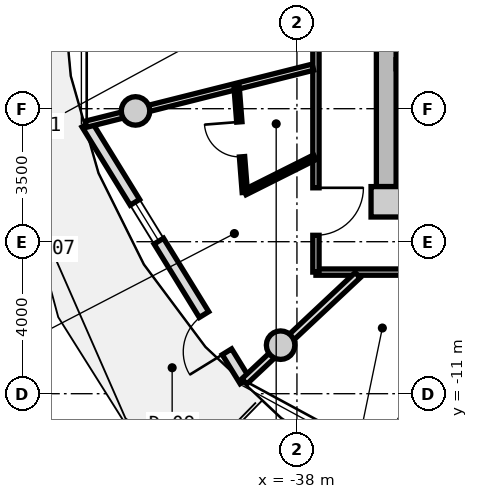
"""IFC4 building model, lengths in metres.
Left out: names, types, materials, properties, quantities, classifications, styles, units other than length and angle.
Written with IfcOpenShell. Run it as: python <this file> out.ifc"""

import sys

from ifc_helpers import new_model, si_unit, direction, frame, frame_2d, origin, origin_2d, place, context, subcontext, project, spatial, rectangle, circle, extrude, source, transform, mapped, element, fill, save


model = new_model("IFC4")
c1 = context("Model", 3, precision=1e-05, world=origin(), true_north=direction((0.0, 1.0)))
c2 = subcontext(c1, "Body", "Model", "MODEL_VIEW")
j1 = project(units=[si_unit("LENGTHUNIT", "METRE"), si_unit("PLANEANGLEUNIT", "RADIAN")], contexts=[c1])
p1 = place(None, origin())
s1 = spatial("IfcSite", under=j1, at=p1, CompositionType="ELEMENT")
p2 = place(p1, origin())
s2 = spatial("IfcBuilding", under=s1, at=p2, CompositionType="ELEMENT")
p3 = place(p2, frame((0.0, 0.0, 232.2)))
s3 = spatial("IfcBuildingStorey", under=s2, at=p3, CompositionType="ELEMENT", Elevation=232.2)
m1 = source(origin(), c2, "Body", "SweptSolid", [
    extrude(rectangle(XDim=0.8, YDim=0.8, at=origin_2d()), origin(), (0.0, 0.0, 1.0), 3.05),
])
p4 = place(p3, frame((-35.65, -5.95, 0.0), z_axis=(0.0, 0.0, 1.0), x_axis=(1.0, 0.0, 0.0)))
e1 = element("IfcColumn", 1, at=p4, inside=s3, PredefinedType="COLUMN", context=c2, shape_type="MappedRepresentation", body=[
    mapped(m1, transform((0.0, 0.0, 0.0), x_axis=(1.0, 0.0, 0.0), y_axis=(0.0, 1.0, 0.0), z_axis=(0.0, 0.0, 1.0), scale=1.0)),
])
m2 = source(origin(), c2, "Body", "SweptSolid", [
    extrude(rectangle(XDim=11.1, YDim=0.52, at=frame_2d((5.55, 0.0))), origin(), (0.0, 0.0, 1.0), 2.81),
])
p5 = place(p3, frame((-35.65, -5.55, 0.0), z_axis=(0.0, 0.0, 1.0), x_axis=(0.0, 1.0, 0.0)))
e2 = element("IfcWall", 2, at=p5, inside=s3, PredefinedType="SHEAR", context=c2, shape_type="MappedRepresentation", body=[
    mapped(m2, transform((0.0, 0.0, 0.0), x_axis=(1.0, 0.0, 0.0), y_axis=(0.0, 1.0, 0.0), z_axis=(0.0, 0.0, 1.0), scale=1.0)),
])
p6 = place(p5, frame((3.8, 0.0, 0.0)))
e3 = element("IfcOpeningElement", 3, at=p6, cuts=e2, PredefinedType="OPENING", context=c2, shape_type="SweptSolid", body=[
    extrude(rectangle(XDim=1.2, YDim=2.15, at=frame_2d((0.6, 1.075))), frame((0.0, 0.27, 0.0), z_axis=(0.0, -1.0, 0.0), x_axis=(1.0, 0.0, 0.0)), (0.0, 0.0, 1.0), 0.54),
])
m3 = source(origin(), c2, "Body", "SweptSolid", [
    extrude(circle(Radius=0.375, at=origin_2d()), origin(), (0.0, 0.0, 1.0), 3.05),
])
for number, where, z_axis, x_axis in (
    (4, (-42.247, -3.559, 0.0), (0.0, 0.0, 1.0), (1.0, 0.0, 0.0)),
    (5, (-38.43, -9.723, 0.0), (0.0, 0.0, 1.0), (1.0, 0.0, 0.0)),
):
    element("IfcColumn", number, at=place(p3, frame(where, z_axis=z_axis, x_axis=x_axis)), inside=s3, PredefinedType="COLUMN", context=c2, shape_type="MappedRepresentation", body=[
        mapped(m3, transform((0.0, 0.0, 0.0), x_axis=(1.0, 0.0, 0.0), y_axis=(0.0, 1.0, 0.0), z_axis=(0.0, 0.0, 1.0), scale=1.0)),
    ])
m4 = source(origin(), c2, "Body", "SweptSolid", [
    extrude(rectangle(XDim=7.938, YDim=0.29, at=frame_2d((3.969, 0.0))), origin(), (0.0, 0.0, 1.0), 2.81),
])
p7 = place(p3, frame((-39.37, -10.663, 0.0), z_axis=(0.0, 0.0, 1.0), x_axis=(-0.524244987663, 0.851567491694, 0.0)))
e6 = element("IfcWall", 6, at=p7, inside=s3, PredefinedType="SOLIDWALL", context=c2, shape_type="MappedRepresentation", body=[
    mapped(m4, transform((0.0, 0.0, 0.0), x_axis=(1.0, 0.0, 0.0), y_axis=(0.0, 1.0, 0.0), z_axis=(0.0, 0.0, 1.0), scale=1.0)),
])
p8 = place(p7, frame((0.9, 0.0, 0.0)))
e7 = element("IfcOpeningElement", 7, at=p8, cuts=e6, PredefinedType="OPENING", context=c2, shape_type="SweptSolid", body=[
    extrude(rectangle(XDim=1.15, YDim=2.25, at=frame_2d((0.575, 1.125))), frame((0.0, 0.155, 0.0), z_axis=(0.0, -1.0, 0.0), x_axis=(1.0, 0.0, 0.0)), (0.0, 0.0, 1.0), 0.31),
])
p9 = place(p7, frame((4.319, 0.0, 0.85)))
e8 = element("IfcOpeningElement", 8, at=p9, cuts=e6, PredefinedType="OPENING", context=c2, shape_type="SweptSolid", body=[
    extrude(rectangle(XDim=1.2, YDim=1.5, at=frame_2d((0.6, 0.75))), frame((0.0, 0.155, 0.0), z_axis=(0.0, -1.0, 0.0), x_axis=(1.0, 0.0, 0.0)), (0.0, 0.0, 1.0), 0.31),
])
m5 = source(origin(), c2, "Body", "SweptSolid", [
    extrude(rectangle(XDim=7.93, YDim=0.24, at=frame_2d((3.965, 0.0))), origin(), (0.0, 0.0, 1.0), 2.81),
])
p10 = place(p3, frame((-35.39, -2.33, 0.0), z_axis=(0.0, 0.0, 1.0), x_axis=(1.0, 0.0, 0.0)))
e9 = element("IfcWall", 9, at=p10, inside=s3, PredefinedType="PARTITIONING", context=c2, shape_type="MappedRepresentation", body=[
    mapped(m5, transform((0.0, 0.0, 0.0), x_axis=(1.0, 0.0, 0.0), y_axis=(0.0, 1.0, 0.0), z_axis=(0.0, 0.0, 1.0), scale=1.0)),
])
p11 = place(p10, frame((1.05, 0.0, 0.0)))
e10 = element("IfcOpeningElement", 10, at=p11, cuts=e9, PredefinedType="OPENING", context=c2, shape_type="SweptSolid", body=[
    extrude(rectangle(XDim=1.1, YDim=2.15, at=frame_2d((0.55, 1.075))), frame((0.0, 0.13, 0.0), z_axis=(0.0, -1.0, 0.0), x_axis=(1.0, 0.0, 0.0)), (0.0, 0.0, 1.0), 0.26),
])
m6 = source(origin(), c2, "Body", "SweptSolid", [
    extrude(rectangle(XDim=19.0, YDim=0.165, at=frame_2d((9.5, 0.0))), origin(), (0.0, 0.0, 1.0), 2.795),
])
p12 = place(p3, frame((-18.5, -7.8, 0.0), z_axis=(0.0, 0.0, 1.0), x_axis=(-1.0, 0.0, 0.0)))
e11 = element("IfcWall", 11, at=p12, inside=s3, PredefinedType="PARTITIONING", context=c2, shape_type="MappedRepresentation", body=[
    mapped(m6, transform((0.0, 0.0, 0.0), x_axis=(1.0, 0.0, 0.0), y_axis=(0.0, 1.0, 0.0), z_axis=(0.0, 0.0, 1.0), scale=1.0)),
])
p13 = place(p12, frame((15.586, 0.0, 0.0)))
e12 = element("IfcOpeningElement", 12, at=p13, cuts=e11, PredefinedType="OPENING", context=c2, shape_type="SweptSolid", body=[
    extrude(rectangle(XDim=1.05, YDim=2.15, at=frame_2d((0.525, 1.075))), frame((0.0, 0.093, 0.0), z_axis=(0.0, -1.0, 0.0), x_axis=(1.0, 0.0, 0.0)), (0.0, 0.0, 1.0), 0.185),
])
p14 = place(p12, frame((12.465, 0.0, 0.0)))
e13 = element("IfcOpeningElement", 13, at=p14, cuts=e11, PredefinedType="OPENING", context=c2, shape_type="SweptSolid", body=[
    extrude(rectangle(XDim=1.05, YDim=2.15, at=frame_2d((0.525, 1.075))), frame((0.0, 0.093, 0.0), z_axis=(0.0, -1.0, 0.0), x_axis=(1.0, 0.0, 0.0)), (0.0, 0.0, 1.0), 0.185),
])
p15 = place(p12, frame((8.875, 0.0, 0.0)))
e14 = element("IfcOpeningElement", 14, at=p15, cuts=e11, PredefinedType="OPENING", context=c2, shape_type="SweptSolid", body=[
    extrude(rectangle(XDim=1.25, YDim=2.2, at=frame_2d((0.625, 1.1))), frame((0.0, 0.093, 0.0), z_axis=(0.0, -1.0, 0.0), x_axis=(1.0, 0.0, 0.0)), (0.0, 0.0, 1.0), 0.185),
])
p16 = place(p12, frame((3.559, 0.0, 0.0)))
e15 = element("IfcOpeningElement", 15, at=p16, cuts=e11, PredefinedType="OPENING", context=c2, shape_type="SweptSolid", body=[
    extrude(rectangle(XDim=1.25, YDim=2.2, at=frame_2d((0.625, 1.1))), frame((0.0, 0.093, 0.0), z_axis=(0.0, -1.0, 0.0), x_axis=(1.0, 0.0, 0.0)), (0.0, 0.0, 1.0), 0.185),
])
m7 = source(origin(), c2, "Body", "SweptSolid", [
    extrude(rectangle(XDim=6.88, YDim=0.165, at=frame_2d((3.44, 0.0))), origin(), (0.0, 0.0, 1.0), 2.795),
])
p17 = place(p3, frame((-37.5, -7.8, 0.0), z_axis=(0.0, 0.0, 1.0), x_axis=(0.0, 1.0, 0.0)))
e16 = element("IfcWall", 16, at=p17, inside=s3, PredefinedType="PARTITIONING", context=c2, shape_type="MappedRepresentation", body=[
    mapped(m7, transform((0.0, 0.0, 0.0), x_axis=(1.0, 0.0, 0.0), y_axis=(0.0, 1.0, 0.0), z_axis=(0.0, 0.0, 1.0), scale=1.0)),
])
p18 = place(p17, frame((0.968, 0.0, 0.0)))
e17 = element("IfcOpeningElement", 17, at=p18, cuts=e16, PredefinedType="OPENING", context=c2, shape_type="SweptSolid", body=[
    extrude(rectangle(XDim=1.25, YDim=2.2, at=frame_2d((0.625, 1.1))), frame((0.0, 0.093, 0.0), z_axis=(0.0, -1.0, 0.0), x_axis=(1.0, 0.0, 0.0)), (0.0, 0.0, 1.0), 0.185),
])
m8 = source(origin(), c2, "Body", "SweptSolid", [
    extrude(rectangle(XDim=6.157, YDim=0.165, at=frame_2d((3.079, 0.0))), origin(), (0.0, 0.0, 1.0), 2.395),
])
p19 = place(p3, frame((-37.58, -2.407, 0.0), z_axis=(0.0, 0.0, 1.0), x_axis=(-0.969840867184, -0.243738984038, 0.0)))
e18 = element("IfcWall", 18, at=p19, inside=s3, PredefinedType="PARTITIONING", context=c2, shape_type="MappedRepresentation", body=[
    mapped(m8, transform((0.0, 0.0, 0.0), x_axis=(1.0, 0.0, 0.0), y_axis=(0.0, 1.0, 0.0), z_axis=(0.0, 0.0, 1.0), scale=1.0)),
])
m9 = source(origin(), c2, "Body", "SweptSolid", [
    extrude(rectangle(XDim=4.089, YDim=0.19, at=frame_2d((2.044, 0.0))), origin(), (0.0, 0.0, 1.0), 2.395),
])
p20 = place(p3, frame((-36.402, -7.88, 0.0), z_axis=(0.0, 0.0, 1.0), x_axis=(-0.729401273609, -0.684086092577, 0.0)))
e19 = element("IfcWall", 19, at=p20, inside=s3, PredefinedType="PARTITIONING", context=c2, shape_type="MappedRepresentation", body=[
    mapped(m9, transform((0.0, 0.0, 0.0), x_axis=(1.0, 0.0, 0.0), y_axis=(0.0, 1.0, 0.0), z_axis=(0.0, 0.0, 1.0), scale=1.0)),
])
m10 = source(origin(), c2, "Body", "SweptSolid", [
    extrude(rectangle(XDim=2.06, YDim=0.14, at=frame_2d((1.03, 0.0))), origin(), (0.0, 0.0, 1.0), 2.795),
])
p21 = place(p3, frame((-37.53, -4.778, 0.0), z_axis=(0.0, 0.0, 1.0), x_axis=(-0.893952568722, -0.448161583444, 0.0)))
e20 = element("IfcWall", 20, at=p21, inside=s3, PredefinedType="PARTITIONING", context=c2, shape_type="MappedRepresentation", body=[
    mapped(m10, transform((0.0, 0.0, 0.0), x_axis=(1.0, 0.0, 0.0), y_axis=(0.0, 1.0, 0.0), z_axis=(0.0, 0.0, 1.0), scale=1.0)),
])
m11 = source(origin(), c2, "Body", "SweptSolid", [
    extrude(rectangle(XDim=2.798, YDim=0.14, at=frame_2d((1.399, 0.0))), origin(), (0.0, 0.0, 1.0), 2.795),
])
p22 = place(p3, frame((-39.371, -5.701, 0.0), z_axis=(0.0, 0.0, 1.0), x_axis=(-0.077823984089, 0.996967114553, 0.0)))
e21 = element("IfcWall", 21, at=p22, inside=s3, PredefinedType="PARTITIONING", context=c2, shape_type="MappedRepresentation", body=[
    mapped(m11, transform((0.0, 0.0, 0.0), x_axis=(1.0, 0.0, 0.0), y_axis=(0.0, 1.0, 0.0), z_axis=(0.0, 0.0, 1.0), scale=1.0)),
])
p23 = place(p22, frame((0.939, 0.0, 0.0)))
e22 = element("IfcOpeningElement", 22, at=p23, cuts=e21, PredefinedType="OPENING", context=c2, shape_type="SweptSolid", body=[
    extrude(rectangle(XDim=0.92, YDim=2.1, at=frame_2d((0.46, 1.05))), frame((0.0, 0.08, 0.0), z_axis=(0.0, -1.0, 0.0), x_axis=(1.0, 0.0, 0.0)), (0.0, 0.0, 1.0), 0.16),
])
m12 = source(origin(), c2, "Body", "SweptSolid", [
    extrude(rectangle(XDim=5.652, YDim=0.19, at=frame_2d((2.826, 0.0))), origin(), (0.0, 0.0, 1.0), 2.795),
])
p24 = place(p3, frame((-32.794, -7.83, 0.0), z_axis=(0.0, 0.0, 1.0), x_axis=(-0.527566076956, -0.84951399897, 0.0)))
e23 = element("IfcWall", 23, at=p24, inside=s3, PredefinedType="PARTITIONING", context=c2, shape_type="MappedRepresentation", body=[
    mapped(m12, transform((0.0, 0.0, 0.0), x_axis=(1.0, 0.0, 0.0), y_axis=(0.0, 1.0, 0.0), z_axis=(0.0, 0.0, 1.0), scale=1.0)),
])
m13 = source(origin(), c2, "Body", "SweptSolid", [
    extrude(rectangle(XDim=1.15, YDim=2.25, at=frame_2d((0.575, 1.125))), frame((0.0, 0.025, 0.0), z_axis=(0.0, -1.0, 0.0), x_axis=(1.0, 0.0, 0.0)), (0.0, 0.0, 1.0), 0.05),
])
p25 = place(p8, origin())
e24 = element("IfcDoor", 24, at=p25, inside=s3, OperationType="SINGLE_SWING_LEFT", PredefinedType="DOOR", context=c2, shape_type="MappedRepresentation", body=[
    mapped(m13, transform((0.0, 0.0, 0.0), x_axis=(1.0, 0.0, 0.0), y_axis=(0.0, 1.0, 0.0), z_axis=(0.0, 0.0, 1.0), scale=1.0)),
])
fill(e7, e24)
m14 = source(origin(), c2, "Body", "SweptSolid", [
    extrude(rectangle(XDim=1.2, YDim=1.5, at=frame_2d((0.6, 0.75))), frame((0.0, 0.03, 0.0), z_axis=(0.0, -1.0, 0.0), x_axis=(1.0, 0.0, 0.0)), (0.0, 0.0, 1.0), 0.06),
])
p26 = place(p9, origin())
e25 = element("IfcWindow", 25, at=p26, inside=s3, PartitioningType="SINGLE_PANEL", PredefinedType="WINDOW", context=c2, shape_type="MappedRepresentation", body=[
    mapped(m14, transform((0.0, 0.0, 0.0), x_axis=(1.0, 0.0, 0.0), y_axis=(0.0, 1.0, 0.0), z_axis=(0.0, 0.0, 1.0), scale=1.0)),
])
fill(e8, e25)
m15 = source(origin(), c2, "Body", "SweptSolid", [
    extrude(rectangle(XDim=1.25, YDim=2.2, at=frame_2d((0.625, 1.1))), frame((0.0, 0.025, 0.0), z_axis=(0.0, -1.0, 0.0), x_axis=(1.0, 0.0, 0.0)), (0.0, 0.0, 1.0), 0.05),
])
p27 = place(p18, frame((1.25, 0.0, 0.0), z_axis=(0.0, 0.0, 1.0), x_axis=(-1.0, 0.0, 0.0)))
e26 = element("IfcDoor", 26, at=p27, inside=s3, OperationType="SINGLE_SWING_LEFT", PredefinedType="DOOR", context=c2, shape_type="MappedRepresentation", body=[
    mapped(m15, transform((0.0, 0.0, 0.0), x_axis=(1.0, 0.0, 0.0), y_axis=(0.0, 1.0, 0.0), z_axis=(0.0, 0.0, 1.0), scale=1.0)),
])
fill(e17, e26)
m16 = source(origin(), c2, "Body", "SweptSolid", [
    extrude(rectangle(XDim=0.92, YDim=2.1, at=frame_2d((0.46, 1.05))), frame((0.0, 0.025, 0.0), z_axis=(0.0, -1.0, 0.0), x_axis=(1.0, 0.0, 0.0)), (0.0, 0.0, 1.0), 0.05),
])
p28 = place(p23, origin())
e27 = element("IfcDoor", 27, at=p28, inside=s3, OperationType="SINGLE_SWING_RIGHT", PredefinedType="DOOR", context=c2, shape_type="MappedRepresentation", body=[
    mapped(m16, transform((0.0, 0.0, 0.0), x_axis=(1.0, 0.0, 0.0), y_axis=(0.0, 1.0, 0.0), z_axis=(0.0, 0.0, 1.0), scale=1.0)),
])
fill(e22, e27)
save(model, sys.argv[1])
